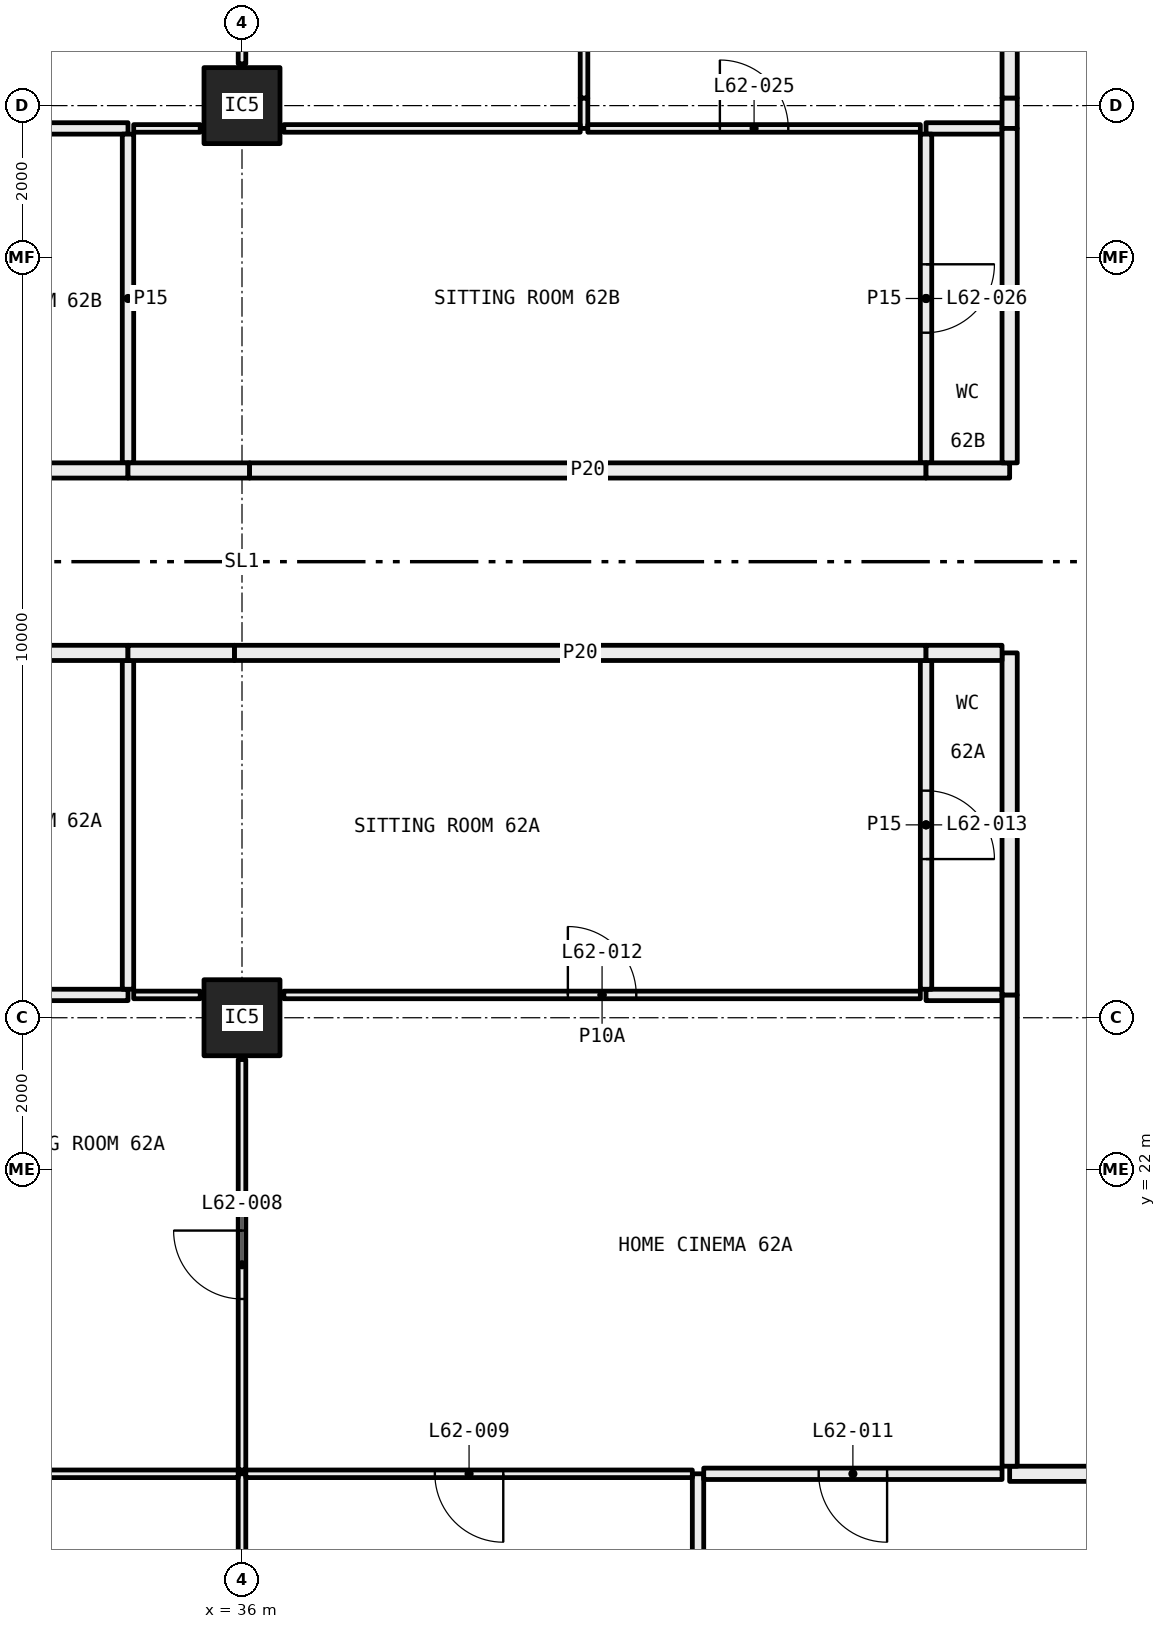
"""IFC4 building model, lengths in metres.
Left out: names, types, materials, properties, quantities, classifications, styles, units other than length and angle.
Written with IfcOpenShell. Run it as: python <this file> out.ifc"""

import sys

from ifc_helpers import new_model, si_unit, direction, frame, frame_2d, origin, origin_2d, place, context, subcontext, project, spatial, rectangle, hollow_rectangle, extrude, element, fill, save


model = new_model("IFC4")
c1 = context("Model", 3, precision=1e-05, world=origin(), true_north=direction((0.0, 1.0)))
c2 = subcontext(c1, "Body", "Model", "MODEL_VIEW")
j1 = project(units=[si_unit("LENGTHUNIT", "METRE"), si_unit("PLANEANGLEUNIT", "RADIAN")], contexts=[c1])
p1 = place(None, origin())
s1 = spatial("IfcSite", under=j1, at=p1, CompositionType="ELEMENT")
p2 = place(p1, origin())
s2 = spatial("IfcBuilding", under=s1, at=p2, CompositionType="ELEMENT")
p3 = place(p2, frame((0.0, 0.0, 231.75)))
s3 = spatial("IfcBuildingStorey", under=s2, at=p3, CompositionType="ELEMENT", Elevation=231.75)
for number, where, z_axis, x_axis in (
    (1, (36.0, 24.0, 0.0), (0.0, 0.0, 1.0), (1.0, 0.0, 0.0)),
    (2, (36.0, 36.0, 0.0), (0.0, 0.0, 1.0), (1.0, 0.0, 0.0)),
):
    element("IfcColumn", number, at=place(p3, frame(where, z_axis=z_axis, x_axis=x_axis)), inside=s3, PredefinedType="COLUMN", context=c2, shape_type="SweptSolid", body=[
        extrude(hollow_rectangle(XDim=1.0, YDim=1.0, WallThickness=0.04, at=origin_2d()), origin(), (0.0, 0.0, 1.0), 3.05),
    ])
p4 = place(p3, frame((36.0, 12.72, 0.0), z_axis=(0.0, 0.0, 1.0), x_axis=(0.0, 1.0, 0.0)))
e3 = element("IfcWall", 3, at=p4, inside=s3, PredefinedType="PARTITIONING", context=c2, shape_type="SweptSolid", body=[
    extrude(rectangle(XDim=5.28, YDim=0.1, at=frame_2d((2.64, 0.0))), origin(), (0.0, 0.0, 1.0), 2.45),
])
p5 = place(p3, frame((35.95, 18.0, 0.0), z_axis=(0.0, 0.0, 1.0), x_axis=(-1.0, 0.0, 0.0)))
e4 = element("IfcWall", 4, at=p5, inside=s3, PredefinedType="PARTITIONING", context=c2, shape_type="SweptSolid", body=[
    extrude(rectangle(XDim=4.45, YDim=0.1, at=frame_2d((2.225, 0.0))), origin(), (0.0, 0.0, 1.0), 2.45),
])
p6 = place(p3, frame((42.0, 15.0, 0.0), z_axis=(0.0, 0.0, 1.0), x_axis=(0.0, 1.0, 0.0)))
e5 = element("IfcWall", 5, at=p6, inside=s3, PredefinedType="PARTITIONING", context=c2, shape_type="SweptSolid", body=[
    extrude(rectangle(XDim=3.0, YDim=0.15, at=frame_2d((1.5, 0.0))), origin(), (0.0, 0.0, 1.0), 3.05),
])
p7 = place(p3, frame((41.925, 18.0, 0.0), z_axis=(0.0, 0.0, 1.0), x_axis=(-1.0, 0.0, 0.0)))
e6 = element("IfcWall", 6, at=p7, inside=s3, PredefinedType="PARTITIONING", context=c2, shape_type="SweptSolid", body=[
    extrude(rectangle(XDim=5.875, YDim=0.1, at=frame_2d((2.938, 0.0))), origin(), (0.0, 0.0, 1.0), 2.45),
])
p8 = place(p7, frame((2.488, 0.0, 0.0)))
e7 = element("IfcOpeningElement", 7, at=p8, cuts=e6, PredefinedType="OPENING", context=c2, shape_type="SweptSolid", body=[
    extrude(rectangle(XDim=0.9, YDim=2.1, at=frame_2d((0.45, 1.05))), frame((0.0, 0.06, 0.0), z_axis=(0.0, -1.0, 0.0), x_axis=(1.0, 0.0, 0.0)), (0.0, 0.0, 1.0), 0.12),
])
p9 = place(p3, frame((46.0, 18.0, 0.0), z_axis=(0.0, 0.0, 1.0), x_axis=(-1.0, 0.0, 0.0)))
e8 = element("IfcWall", 8, at=p9, inside=s3, PredefinedType="PARTITIONING", context=c2, shape_type="SweptSolid", body=[
    extrude(rectangle(XDim=3.925, YDim=0.15, at=frame_2d((1.962, 0.0))), origin(), (0.0, 0.0, 1.0), 3.05),
])
p10 = place(p9, frame((1.512, 0.0, 0.0)))
e9 = element("IfcOpeningElement", 9, at=p10, cuts=e8, PredefinedType="OPENING", context=c2, shape_type="SweptSolid", body=[
    extrude(rectangle(XDim=0.9, YDim=2.1, at=frame_2d((0.45, 1.05))), frame((0.0, 0.085, 0.0), z_axis=(0.0, -1.0, 0.0), x_axis=(1.0, 0.0, 0.0)), (0.0, 0.0, 1.0), 0.17),
])
p11 = place(p3, frame((47.9, 18.0, 0.0), z_axis=(0.0, 0.0, 1.0), x_axis=(-1.0, 0.0, 0.0)))
e10 = element("IfcWall", 10, at=p11, inside=s3, PredefinedType="PARTITIONING", context=c2, shape_type="SweptSolid", body=[
    extrude(rectangle(XDim=1.8, YDim=0.2, at=frame_2d((0.9, 0.0))), origin(), (0.0, 0.0, 1.0), 3.05),
])
p12 = place(p3, frame((36.0, 18.05, 0.0), z_axis=(0.0, 0.0, 1.0), x_axis=(0.0, 1.0, 0.0)))
e11 = element("IfcWall", 11, at=p12, inside=s3, PredefinedType="PARTITIONING", context=c2, shape_type="SweptSolid", body=[
    extrude(rectangle(XDim=5.4, YDim=0.1, at=frame_2d((2.7, 0.0))), origin(), (0.0, 0.0, 1.0), 2.45),
])
p13 = place(p12, frame((2.25, 0.0, 0.0)))
e12 = element("IfcOpeningElement", 12, at=p13, cuts=e11, PredefinedType="OPENING", context=c2, shape_type="SweptSolid", body=[
    extrude(rectangle(XDim=0.9, YDim=2.1, at=frame_2d((0.45, 1.05))), frame((0.0, 0.06, 0.0), z_axis=(0.0, -1.0, 0.0), x_axis=(1.0, 0.0, 0.0)), (0.0, 0.0, 1.0), 0.12),
])
p14 = place(p3, frame((34.5, 24.3, 0.0), z_axis=(0.0, 0.0, 1.0), x_axis=(-1.0, 0.0, 0.0)))
e13 = element("IfcWall", 13, at=p14, inside=s3, PredefinedType="PARTITIONING", context=c2, shape_type="SweptSolid", body=[
    extrude(rectangle(XDim=3.0, YDim=0.15, at=frame_2d((1.5, 0.0))), origin(), (0.0, 0.0, 1.0), 3.05),
])
p15 = place(p3, frame((35.45, 24.3, 0.0), z_axis=(0.0, 0.0, 1.0), x_axis=(-1.0, 0.0, 0.0)))
e14 = element("IfcWall", 14, at=p15, inside=s3, PredefinedType="PARTITIONING", context=c2, shape_type="SweptSolid", body=[
    extrude(rectangle(XDim=0.875, YDim=0.1, at=frame_2d((0.438, 0.0))), origin(), (0.0, 0.0, 1.0), 3.05),
])
p16 = place(p3, frame((44.925, 24.3, 0.0), z_axis=(0.0, 0.0, 1.0), x_axis=(-1.0, 0.0, 0.0)))
e15 = element("IfcWall", 15, at=p16, inside=s3, PredefinedType="PARTITIONING", context=c2, shape_type="SweptSolid", body=[
    extrude(rectangle(XDim=8.375, YDim=0.1, at=frame_2d((4.188, 0.0))), origin(), (0.0, 0.0, 1.0), 3.05),
])
p17 = place(p16, frame((3.738, 0.0, 0.0)))
e16 = element("IfcOpeningElement", 16, at=p17, cuts=e15, PredefinedType="OPENING", context=c2, shape_type="SweptSolid", body=[
    extrude(rectangle(XDim=0.9, YDim=2.1, at=frame_2d((0.45, 1.05))), frame((0.0, 0.06, 0.0), z_axis=(0.0, -1.0, 0.0), x_axis=(1.0, 0.0, 0.0)), (0.0, 0.0, 1.0), 0.12),
])
p18 = place(p3, frame((46.0, 24.3, 0.0), z_axis=(0.0, 0.0, 1.0), x_axis=(-1.0, 0.0, 0.0)))
e17 = element("IfcWall", 17, at=p18, inside=s3, PredefinedType="PARTITIONING", context=c2, shape_type="SweptSolid", body=[
    extrude(rectangle(XDim=1.0, YDim=0.15, at=frame_2d((0.5, 0.0))), origin(), (0.0, 0.0, 1.0), 3.05),
])
p19 = place(p3, frame((46.1, 18.1, 0.0), z_axis=(0.0, 0.0, 1.0), x_axis=(0.0, 1.0, 0.0)))
e18 = element("IfcWall", 18, at=p19, inside=s3, PredefinedType="PARTITIONING", context=c2, shape_type="SweptSolid", body=[
    extrude(rectangle(XDim=6.2, YDim=0.2, at=frame_2d((3.1, 0.0))), origin(), (0.0, 0.0, 1.0), 2.45),
])
p20 = place(p3, frame((34.5, 24.375, 0.0), z_axis=(0.0, 0.0, 1.0), x_axis=(0.0, 1.0, 0.0)))
e19 = element("IfcWall", 19, at=p20, inside=s3, PredefinedType="PARTITIONING", context=c2, shape_type="SweptSolid", body=[
    extrude(rectangle(XDim=4.325, YDim=0.15, at=frame_2d((2.163, 0.0))), origin(), (0.0, 0.0, 1.0), 3.05),
])
p21 = place(p3, frame((34.5, 28.8, 0.0), z_axis=(0.0, 0.0, 1.0), x_axis=(-1.0, 0.0, 0.0)))
e20 = element("IfcWall", 20, at=p21, inside=s3, PredefinedType="PARTITIONING", context=c2, shape_type="SweptSolid", body=[
    extrude(rectangle(XDim=4.5, YDim=0.2, at=frame_2d((2.25, 0.0))), origin(), (0.0, 0.0, 1.0), 3.05),
])
p22 = place(p3, frame((45.0, 24.375, 0.0), z_axis=(0.0, 0.0, 1.0), x_axis=(0.0, 1.0, 0.0)))
e21 = element("IfcWall", 21, at=p22, inside=s3, PredefinedType="PARTITIONING", context=c2, shape_type="SweptSolid", body=[
    extrude(rectangle(XDim=4.325, YDim=0.15, at=frame_2d((2.163, 0.0))), origin(), (0.0, 0.0, 1.0), 3.05),
])
p23 = place(p22, frame((1.712, 0.0, 0.0)))
e22 = element("IfcOpeningElement", 22, at=p23, cuts=e21, PredefinedType="OPENING", context=c2, shape_type="SweptSolid", body=[
    extrude(rectangle(XDim=0.9, YDim=2.1, at=frame_2d((0.45, 1.05))), frame((0.0, 0.085, 0.0), z_axis=(0.0, -1.0, 0.0), x_axis=(1.0, 0.0, 0.0)), (0.0, 0.0, 1.0), 0.17),
])
p24 = place(p3, frame((45.0, 28.8, 0.0), z_axis=(0.0, 0.0, 1.0), x_axis=(-1.0, 0.0, 0.0)))
e23 = element("IfcWall", 23, at=p24, inside=s3, PredefinedType="PARTITIONING", context=c2, shape_type="SweptSolid", body=[
    extrude(rectangle(XDim=9.1, YDim=0.2, at=frame_2d((4.55, 0.0))), origin(), (0.0, 0.0, 1.0), 2.45),
])
p25 = place(p3, frame((35.9, 28.8, 0.0), z_axis=(0.0, 0.0, 1.0), x_axis=(-1.0, 0.0, 0.0)))
e24 = element("IfcWall", 24, at=p25, inside=s3, PredefinedType="PARTITIONING", context=c2, shape_type="SweptSolid", body=[
    extrude(rectangle(XDim=1.4, YDim=0.2, at=frame_2d((0.7, 0.0))), origin(), (0.0, 0.0, 1.0), 3.05),
])
p26 = place(p3, frame((46.1, 24.3, 0.0), z_axis=(0.0, 0.0, 1.0), x_axis=(0.0, 1.0, 0.0)))
e25 = element("IfcWall", 25, at=p26, inside=s3, PredefinedType="PARTITIONING", context=c2, shape_type="SweptSolid", body=[
    extrude(rectangle(XDim=4.5, YDim=0.2, at=frame_2d((2.25, 0.0))), origin(), (0.0, 0.0, 1.0), 3.05),
])
p27 = place(p3, frame((46.0, 28.8, 0.0), z_axis=(0.0, 0.0, 1.0), x_axis=(-1.0, 0.0, 0.0)))
e26 = element("IfcWall", 26, at=p27, inside=s3, PredefinedType="PARTITIONING", context=c2, shape_type="SweptSolid", body=[
    extrude(rectangle(XDim=1.0, YDim=0.2, at=frame_2d((0.5, 0.0))), origin(), (0.0, 0.0, 1.0), 3.05),
])
p28 = place(p3, frame((36.0, 36.55, 0.0), z_axis=(0.0, 0.0, 1.0), x_axis=(0.0, 1.0, 0.0)))
e27 = element("IfcWall", 27, at=p28, inside=s3, PredefinedType="PARTITIONING", context=c2, shape_type="SweptSolid", body=[
    extrude(rectangle(XDim=5.4, YDim=0.1, at=frame_2d((2.7, 0.0))), origin(), (0.0, 0.0, 1.0), 2.45),
])
p29 = place(p28, frame((2.25, 0.0, 0.0)))
e28 = element("IfcOpeningElement", 28, at=p29, cuts=e27, PredefinedType="OPENING", context=c2, shape_type="SweptSolid", body=[
    extrude(rectangle(XDim=0.9, YDim=2.1, at=frame_2d((0.45, 1.05))), frame((0.0, 0.06, 0.0), z_axis=(0.0, -1.0, 0.0), x_axis=(1.0, 0.0, 0.0)), (0.0, 0.0, 1.0), 0.12),
])
p30 = place(p3, frame((31.5, 35.7, 0.0), z_axis=(0.0, 0.0, 1.0), x_axis=(1.0, 0.0, 0.0)))
e29 = element("IfcWall", 29, at=p30, inside=s3, PredefinedType="PARTITIONING", context=c2, shape_type="SweptSolid", body=[
    extrude(rectangle(XDim=3.0, YDim=0.15, at=frame_2d((1.5, 0.0))), origin(), (0.0, 0.0, 1.0), 3.05),
])
p31 = place(p3, frame((34.575, 35.7, 0.0), z_axis=(0.0, 0.0, 1.0), x_axis=(1.0, 0.0, 0.0)))
e30 = element("IfcWall", 30, at=p31, inside=s3, PredefinedType="PARTITIONING", context=c2, shape_type="SweptSolid", body=[
    extrude(rectangle(XDim=0.875, YDim=0.1, at=frame_2d((0.438, 0.0))), origin(), (0.0, 0.0, 1.0), 3.05),
])
p32 = place(p3, frame((40.5, 35.7, 0.0), z_axis=(0.0, 0.0, 1.0), x_axis=(0.0, 1.0, 0.0)))
e31 = element("IfcWall", 31, at=p32, inside=s3, PredefinedType="PARTITIONING", context=c2, shape_type="SweptSolid", body=[
    extrude(rectangle(XDim=0.4, YDim=0.1, at=frame_2d((0.2, 0.0))), origin(), (0.0, 0.0, 1.0), 2.45),
])
p33 = place(p3, frame((40.5, 36.1, 0.0), z_axis=(0.0, 0.0, 1.0), x_axis=(0.0, 1.0, 0.0)))
e32 = element("IfcWall", 32, at=p33, inside=s3, PredefinedType="PARTITIONING", context=c2, shape_type="SweptSolid", body=[
    extrude(rectangle(XDim=5.85, YDim=0.1, at=frame_2d((2.925, 0.0))), origin(), (0.0, 0.0, 1.0), 3.05),
])
p34 = place(p33, frame((2.475, 0.0, 0.0)))
e33 = element("IfcOpeningElement", 33, at=p34, cuts=e32, PredefinedType="OPENING", context=c2, shape_type="SweptSolid", body=[
    extrude(rectangle(XDim=0.9, YDim=2.1, at=frame_2d((0.45, 1.05))), frame((0.0, 0.06, 0.0), z_axis=(0.0, -1.0, 0.0), x_axis=(1.0, 0.0, 0.0)), (0.0, 0.0, 1.0), 0.12),
])
p35 = place(p3, frame((36.55, 35.7, 0.0), z_axis=(0.0, 0.0, 1.0), x_axis=(1.0, 0.0, 0.0)))
e34 = element("IfcWall", 34, at=p35, inside=s3, PredefinedType="PARTITIONING", context=c2, shape_type="SweptSolid", body=[
    extrude(rectangle(XDim=3.9, YDim=0.1, at=frame_2d((1.95, 0.0))), origin(), (0.0, 0.0, 1.0), 3.05),
])
p36 = place(p3, frame((40.55, 35.7, 0.0), z_axis=(0.0, 0.0, 1.0), x_axis=(1.0, 0.0, 0.0)))
e35 = element("IfcWall", 35, at=p36, inside=s3, PredefinedType="PARTITIONING", context=c2, shape_type="SweptSolid", body=[
    extrude(rectangle(XDim=4.375, YDim=0.1, at=frame_2d((2.188, 0.0))), origin(), (0.0, 0.0, 1.0), 3.05),
])
p37 = place(p36, frame((1.738, 0.0, 0.0)))
e36 = element("IfcOpeningElement", 36, at=p37, cuts=e35, PredefinedType="OPENING", context=c2, shape_type="SweptSolid", body=[
    extrude(rectangle(XDim=0.9, YDim=2.1, at=frame_2d((0.45, 1.05))), frame((0.0, 0.06, 0.0), z_axis=(0.0, -1.0, 0.0), x_axis=(1.0, 0.0, 0.0)), (0.0, 0.0, 1.0), 0.12),
])
p38 = place(p3, frame((45.0, 35.7, 0.0), z_axis=(0.0, 0.0, 1.0), x_axis=(1.0, 0.0, 0.0)))
e37 = element("IfcWall", 37, at=p38, inside=s3, PredefinedType="PARTITIONING", context=c2, shape_type="SweptSolid", body=[
    extrude(rectangle(XDim=1.0, YDim=0.15, at=frame_2d((0.5, 0.0))), origin(), (0.0, 0.0, 1.0), 3.05),
])
p39 = place(p3, frame((46.1, 35.7, 0.0), z_axis=(0.0, 0.0, 1.0), x_axis=(0.0, 1.0, 0.0)))
e38 = element("IfcWall", 38, at=p39, inside=s3, PredefinedType="PARTITIONING", context=c2, shape_type="SweptSolid", body=[
    extrude(rectangle(XDim=0.4, YDim=0.2, at=frame_2d((0.2, 0.0))), origin(), (0.0, 0.0, 1.0), 2.45),
])
p40 = place(p3, frame((46.1, 36.1, 0.0), z_axis=(0.0, 0.0, 1.0), x_axis=(0.0, 1.0, 0.0)))
e39 = element("IfcWall", 39, at=p40, inside=s3, PredefinedType="PARTITIONING", context=c2, shape_type="SweptSolid", body=[
    extrude(rectangle(XDim=5.8, YDim=0.2, at=frame_2d((2.9, 0.0))), origin(), (0.0, 0.0, 1.0), 3.05),
])
p41 = place(p3, frame((34.5, 31.3, 0.0), z_axis=(0.0, 0.0, 1.0), x_axis=(0.0, 1.0, 0.0)))
e40 = element("IfcWall", 40, at=p41, inside=s3, PredefinedType="PARTITIONING", context=c2, shape_type="SweptSolid", body=[
    extrude(rectangle(XDim=4.325, YDim=0.15, at=frame_2d((2.163, 0.0))), origin(), (0.0, 0.0, 1.0), 3.05),
])
p42 = place(p3, frame((30.0, 31.2, 0.0), z_axis=(0.0, 0.0, 1.0), x_axis=(1.0, 0.0, 0.0)))
e41 = element("IfcWall", 41, at=p42, inside=s3, PredefinedType="PARTITIONING", context=c2, shape_type="SweptSolid", body=[
    extrude(rectangle(XDim=4.5, YDim=0.2, at=frame_2d((2.25, 0.0))), origin(), (0.0, 0.0, 1.0), 3.05),
])
p43 = place(p3, frame((45.0, 31.3, 0.0), z_axis=(0.0, 0.0, 1.0), x_axis=(0.0, 1.0, 0.0)))
e42 = element("IfcWall", 42, at=p43, inside=s3, PredefinedType="PARTITIONING", context=c2, shape_type="SweptSolid", body=[
    extrude(rectangle(XDim=4.325, YDim=0.15, at=frame_2d((2.163, 0.0))), origin(), (0.0, 0.0, 1.0), 3.05),
])
p44 = place(p43, frame((1.712, 0.0, 0.0)))
e43 = element("IfcOpeningElement", 43, at=p44, cuts=e42, PredefinedType="OPENING", context=c2, shape_type="SweptSolid", body=[
    extrude(rectangle(XDim=0.9, YDim=2.1, at=frame_2d((0.45, 1.05))), frame((0.0, 0.085, 0.0), z_axis=(0.0, -1.0, 0.0), x_axis=(1.0, 0.0, 0.0)), (0.0, 0.0, 1.0), 0.17),
])
p45 = place(p3, frame((34.5, 31.2, 0.0), z_axis=(0.0, 0.0, 1.0), x_axis=(1.0, 0.0, 0.0)))
e44 = element("IfcWall", 44, at=p45, inside=s3, PredefinedType="PARTITIONING", context=c2, shape_type="SweptSolid", body=[
    extrude(rectangle(XDim=1.6, YDim=0.2, at=frame_2d((0.8, 0.0))), origin(), (0.0, 0.0, 1.0), 2.45),
])
p46 = place(p3, frame((36.1, 31.2, 0.0), z_axis=(0.0, 0.0, 1.0), x_axis=(1.0, 0.0, 0.0)))
e45 = element("IfcWall", 45, at=p46, inside=s3, PredefinedType="PARTITIONING", context=c2, shape_type="SweptSolid", body=[
    extrude(rectangle(XDim=8.9, YDim=0.2, at=frame_2d((4.45, 0.0))), origin(), (0.0, 0.0, 1.0), 3.05),
])
p47 = place(p3, frame((45.0, 31.2, 0.0), z_axis=(0.0, 0.0, 1.0), x_axis=(1.0, 0.0, 0.0)))
e46 = element("IfcWall", 46, at=p47, inside=s3, PredefinedType="PARTITIONING", context=c2, shape_type="SweptSolid", body=[
    extrude(rectangle(XDim=1.1, YDim=0.2, at=frame_2d((0.55, 0.0))), origin(), (0.0, 0.0, 1.0), 3.05),
])
p48 = place(p3, frame((46.1, 31.3, 0.0), z_axis=(0.0, 0.0, 1.0), x_axis=(0.0, 1.0, 0.0)))
e47 = element("IfcWall", 47, at=p48, inside=s3, PredefinedType="PARTITIONING", context=c2, shape_type="SweptSolid", body=[
    extrude(rectangle(XDim=4.4, YDim=0.2, at=frame_2d((2.2, 0.0))), origin(), (0.0, 0.0, 1.0), 3.05),
])
p49 = place(p13, origin())
e48 = element("IfcDoor", 48, at=p49, inside=s3, OperationType="SINGLE_SWING_LEFT", PredefinedType="DOOR", context=c2, shape_type="SweptSolid", body=[
    extrude(rectangle(XDim=0.9, YDim=2.1, at=frame_2d((0.45, 1.05))), frame((0.0, 0.025, 0.0), z_axis=(0.0, -1.0, 0.0), x_axis=(1.0, 0.0, 0.0)), (0.0, 0.0, 1.0), 0.05),
])
fill(e12, e48)
p50 = place(p8, origin())
e49 = element("IfcDoor", 49, at=p50, inside=s3, OperationType="SINGLE_SWING_RIGHT", PredefinedType="DOOR", context=c2, shape_type="SweptSolid", body=[
    extrude(rectangle(XDim=0.9, YDim=2.1, at=frame_2d((0.45, 1.05))), frame((0.0, 0.025, 0.0), z_axis=(0.0, -1.0, 0.0), x_axis=(1.0, 0.0, 0.0)), (0.0, 0.0, 1.0), 0.05),
])
fill(e7, e49)
p51 = place(p10, origin())
e50 = element("IfcDoor", 50, at=p51, inside=s3, OperationType="SINGLE_SWING_RIGHT", PredefinedType="DOOR", context=c2, shape_type="SweptSolid", body=[
    extrude(rectangle(XDim=0.9, YDim=2.1, at=frame_2d((0.45, 1.05))), frame((0.0, 0.025, 0.0), z_axis=(0.0, -1.0, 0.0), x_axis=(1.0, 0.0, 0.0)), (0.0, 0.0, 1.0), 0.05),
])
fill(e9, e50)
p52 = place(p17, frame((0.9, 0.0, 0.0), x_axis=(-1.0, 0.0, 0.0)))
e51 = element("IfcDoor", 51, at=p52, inside=s3, OperationType="SINGLE_SWING_RIGHT", PredefinedType="DOOR", context=c2, shape_type="SweptSolid", body=[
    extrude(rectangle(XDim=0.9, YDim=2.1, at=frame_2d((0.45, 1.05))), frame((0.0, 0.025, 0.0), z_axis=(0.0, -1.0, 0.0), x_axis=(1.0, 0.0, 0.0)), (0.0, 0.0, 1.0), 0.05),
])
fill(e16, e51)
p53 = place(p23, frame((0.9, 0.0, 0.0), x_axis=(-1.0, 0.0, 0.0)))
e52 = element("IfcDoor", 52, at=p53, inside=s3, OperationType="SINGLE_SWING_LEFT", PredefinedType="DOOR", context=c2, shape_type="SweptSolid", body=[
    extrude(rectangle(XDim=0.9, YDim=2.1, at=frame_2d((0.45, 1.05))), frame((0.0, 0.025, 0.0), z_axis=(0.0, -1.0, 0.0), x_axis=(1.0, 0.0, 0.0)), (0.0, 0.0, 1.0), 0.05),
])
fill(e22, e52)
p54 = place(p37, origin())
e53 = element("IfcDoor", 53, at=p54, inside=s3, OperationType="SINGLE_SWING_RIGHT", PredefinedType="DOOR", context=c2, shape_type="SweptSolid", body=[
    extrude(rectangle(XDim=0.9, YDim=2.1, at=frame_2d((0.45, 1.05))), frame((0.0, 0.025, 0.0), z_axis=(0.0, -1.0, 0.0), x_axis=(1.0, 0.0, 0.0)), (0.0, 0.0, 1.0), 0.05),
])
fill(e36, e53)
p55 = place(p44, frame((0.9, 0.0, 0.0), x_axis=(-1.0, 0.0, 0.0)))
e54 = element("IfcDoor", 54, at=p55, inside=s3, OperationType="SINGLE_SWING_RIGHT", PredefinedType="DOOR", context=c2, shape_type="SweptSolid", body=[
    extrude(rectangle(XDim=0.9, YDim=2.1, at=frame_2d((0.45, 1.05))), frame((0.0, 0.025, 0.0), z_axis=(0.0, -1.0, 0.0), x_axis=(1.0, 0.0, 0.0)), (0.0, 0.0, 1.0), 0.05),
])
fill(e43, e54)
save(model, sys.argv[1])
